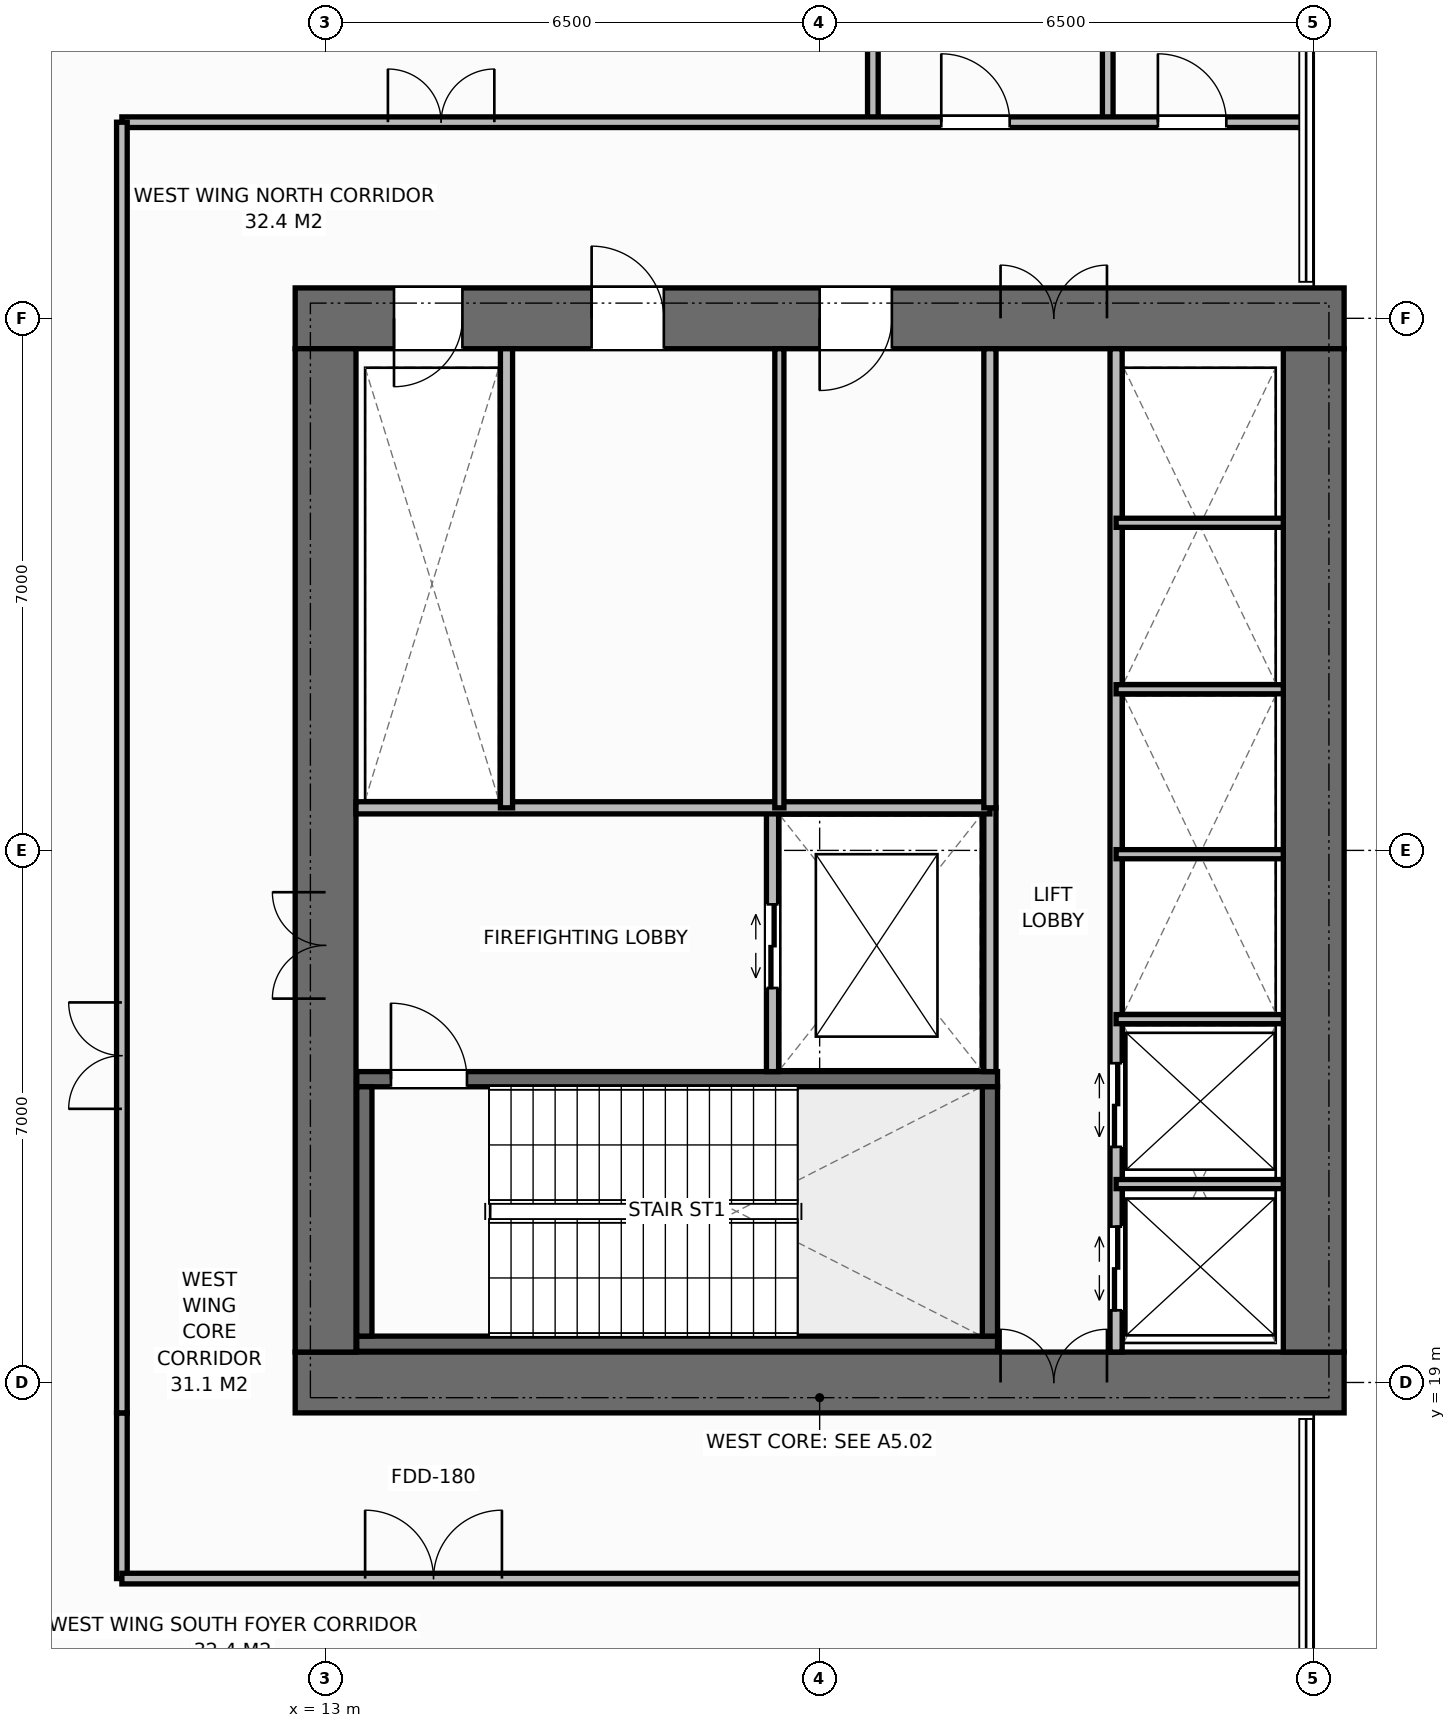
"""IFC4 building model, lengths in metres.
Left out: names, types, materials, properties, quantities, classifications, styles, units other than length and angle.
Written with IfcOpenShell. Run it as: python <this file> out.ifc"""

import sys

from ifc_helpers import new_model, si_unit, direction, frame, frame_2d, origin, place, context, subcontext, project, spatial, rectangle, extrude, element, fill, save


model = new_model("IFC4")
c1 = context("Model", 3, precision=1e-05, world=origin(), true_north=direction((0.0, 1.0)))
c2 = subcontext(c1, "Body", "Model", "MODEL_VIEW")
j1 = project(units=[si_unit("LENGTHUNIT", "METRE"), si_unit("PLANEANGLEUNIT", "RADIAN")], contexts=[c1])
p1 = place(None, origin())
s1 = spatial("IfcSite", under=j1, at=p1, CompositionType="ELEMENT")
p2 = place(p1, origin())
s2 = spatial("IfcBuilding", under=s1, at=p2, CompositionType="ELEMENT")
p3 = place(p2, frame((0.0, 0.0, 17.0)))
s3 = spatial("IfcBuildingStorey", under=s2, at=p3, CompositionType="ELEMENT", Elevation=17.0)
p4 = place(p3, frame((12.6, 19.0, 0.0), z_axis=(0.0, 0.0, 1.0), x_axis=(1.0, 0.0, 0.0)))
e1 = element("IfcWall", 1, at=p4, inside=s3, PredefinedType="SHEAR", context=c2, shape_type="SweptSolid", body=[
    extrude(rectangle(XDim=13.8, YDim=0.8, at=frame_2d((6.9, 0.0))), origin(), (0.0, 0.0, 1.0), 5.0),
])
p5 = place(p4, frame((9.28, 0.0, 0.0)))
e2 = element("IfcOpeningElement", 2, at=p5, cuts=e1, PredefinedType="OPENING", context=c2, shape_type="SweptSolid", body=[
    extrude(rectangle(XDim=1.4, YDim=2.2, at=frame_2d((0.7, 1.1))), frame((0.0, 0.41, 0.0), z_axis=(0.0, -1.0, 0.0), x_axis=(1.0, 0.0, 0.0)), (0.0, 0.0, 1.0), 0.82),
])
p6 = place(p3, frame((12.6, 33.0, 0.0), z_axis=(0.0, 0.0, 1.0), x_axis=(1.0, 0.0, 0.0)))
e3 = element("IfcWall", 3, at=p6, inside=s3, PredefinedType="SHEAR", context=c2, shape_type="SweptSolid", body=[
    extrude(rectangle(XDim=13.8, YDim=0.8, at=frame_2d((6.9, 0.0))), origin(), (0.0, 0.0, 1.0), 5.0),
])
p7 = place(p6, frame((1.3, 0.0, 0.0)))
e4 = element("IfcOpeningElement", 4, at=p7, cuts=e3, PredefinedType="OPENING", context=c2, shape_type="SweptSolid", body=[
    extrude(rectangle(XDim=0.9, YDim=2.15, at=frame_2d((0.45, 1.075))), frame((0.0, 0.41, 0.0), z_axis=(0.0, -1.0, 0.0), x_axis=(1.0, 0.0, 0.0)), (0.0, 0.0, 1.0), 0.82),
])
p8 = place(p6, frame((3.9, 0.0, 0.0)))
e5 = element("IfcOpeningElement", 5, at=p8, cuts=e3, PredefinedType="OPENING", context=c2, shape_type="SweptSolid", body=[
    extrude(rectangle(XDim=0.95, YDim=2.15, at=frame_2d((0.475, 1.075))), frame((0.0, 0.41, 0.0), z_axis=(0.0, -1.0, 0.0), x_axis=(1.0, 0.0, 0.0)), (0.0, 0.0, 1.0), 0.82),
])
p9 = place(p6, frame((6.9, 0.0, 0.0)))
e6 = element("IfcOpeningElement", 6, at=p9, cuts=e3, PredefinedType="OPENING", context=c2, shape_type="SweptSolid", body=[
    extrude(rectangle(XDim=0.95, YDim=2.15, at=frame_2d((0.475, 1.075))), frame((0.0, 0.41, 0.0), z_axis=(0.0, -1.0, 0.0), x_axis=(1.0, 0.0, 0.0)), (0.0, 0.0, 1.0), 0.82),
])
p10 = place(p6, frame((9.28, 0.0, 0.0)))
e7 = element("IfcOpeningElement", 7, at=p10, cuts=e3, PredefinedType="OPENING", context=c2, shape_type="SweptSolid", body=[
    extrude(rectangle(XDim=1.4, YDim=2.2, at=frame_2d((0.7, 1.1))), frame((0.0, 0.41, 0.0), z_axis=(0.0, -1.0, 0.0), x_axis=(1.0, 0.0, 0.0)), (0.0, 0.0, 1.0), 0.82),
])
p11 = place(p3, frame((13.0, 19.4, 0.0), z_axis=(0.0, 0.0, 1.0), x_axis=(0.0, 1.0, 0.0)))
e8 = element("IfcWall", 8, at=p11, inside=s3, PredefinedType="SHEAR", context=c2, shape_type="SweptSolid", body=[
    extrude(rectangle(XDim=13.2, YDim=0.8, at=frame_2d((6.6, 0.0))), origin(), (0.0, 0.0, 1.0), 5.0),
])
p12 = place(p11, frame((4.65, 0.0, 0.0)))
e9 = element("IfcOpeningElement", 9, at=p12, cuts=e8, PredefinedType="OPENING", context=c2, shape_type="SweptSolid", body=[
    extrude(rectangle(XDim=1.4, YDim=2.2, at=frame_2d((0.7, 1.1))), frame((0.0, 0.41, 0.0), z_axis=(0.0, -1.0, 0.0), x_axis=(1.0, 0.0, 0.0)), (0.0, 0.0, 1.0), 0.82),
])
p13 = place(p3, frame((26.0, 19.4, 0.0), z_axis=(0.0, 0.0, 1.0), x_axis=(0.0, 1.0, 0.0)))
e10 = element("IfcWall", 10, at=p13, inside=s3, PredefinedType="SHEAR", context=c2, shape_type="SweptSolid", body=[
    extrude(rectangle(XDim=13.2, YDim=0.8, at=frame_2d((6.6, 0.0))), origin(), (0.0, 0.0, 1.0), 5.0),
])
p14 = place(p3, frame((13.41, 19.51, 0.0), z_axis=(0.0, 0.0, 1.0), x_axis=(1.0, 0.0, 0.0)))
e11 = element("IfcWall", 11, at=p14, inside=s3, PredefinedType="SHEAR", context=c2, shape_type="SweptSolid", body=[
    extrude(rectangle(XDim=8.43, YDim=0.2, at=frame_2d((4.215, 0.0))), origin(), (0.0, 0.0, 1.0), 5.0),
])
p15 = place(p3, frame((13.41, 22.99, 0.0), z_axis=(0.0, 0.0, 1.0), x_axis=(1.0, 0.0, 0.0)))
e12 = element("IfcWall", 12, at=p15, inside=s3, PredefinedType="SHEAR", context=c2, shape_type="SweptSolid", body=[
    extrude(rectangle(XDim=8.43, YDim=0.2, at=frame_2d((4.215, 0.0))), origin(), (0.0, 0.0, 1.0), 5.0),
])
p16 = place(p15, frame((0.45, 0.0, 0.0)))
e13 = element("IfcOpeningElement", 13, at=p16, cuts=e12, PredefinedType="OPENING", context=c2, shape_type="SweptSolid", body=[
    extrude(rectangle(XDim=1.0, YDim=2.15, at=frame_2d((0.5, 1.075))), frame((0.0, 0.11, 0.0), z_axis=(0.0, -1.0, 0.0), x_axis=(1.0, 0.0, 0.0)), (0.0, 0.0, 1.0), 0.22),
])
for number, where, z_axis, x_axis in (
    (14, (13.51, 19.61, 0.0), (0.0, 0.0, 1.0), (0.0, 1.0, 0.0)),
    (15, (21.74, 19.61, 0.0), (0.0, 0.0, 1.0), (0.0, 1.0, 0.0)),
):
    element("IfcWall", number, at=place(p3, frame(where, z_axis=z_axis, x_axis=x_axis)), inside=s3, PredefinedType="SHEAR", context=c2, shape_type="SweptSolid", body=[
        extrude(rectangle(XDim=3.28, YDim=0.2, at=frame_2d((1.64, 0.0))), origin(), (0.0, 0.0, 1.0), 5.0),
    ])
p17 = place(p3, frame((21.74, 23.09, 0.0), z_axis=(0.0, 0.0, 1.0), x_axis=(0.0, 1.0, 0.0)))
e16 = element("IfcWall", 16, at=p17, inside=s3, PredefinedType="STANDARD", context=c2, shape_type="SweptSolid", body=[
    extrude(rectangle(XDim=3.47, YDim=0.16, at=frame_2d((1.735, 0.0))), origin(), (0.0, 0.0, 1.0), 4.4),
])
p18 = place(p3, frame((18.88, 23.09, 0.0), z_axis=(0.0, 0.0, 1.0), x_axis=(0.0, 1.0, 0.0)))
e17 = element("IfcWall", 17, at=p18, inside=s3, PredefinedType="STANDARD", context=c2, shape_type="SweptSolid", body=[
    extrude(rectangle(XDim=3.47, YDim=0.16, at=frame_2d((1.735, 0.0))), origin(), (0.0, 0.0, 1.0), 4.4),
])
p19 = place(p18, frame((1.1, 0.0, 0.0)))
e18 = element("IfcOpeningElement", 18, at=p19, cuts=e17, PredefinedType="OPENING", context=c2, shape_type="SweptSolid", body=[
    extrude(rectangle(XDim=1.1, YDim=2.2, at=frame_2d((0.55, 1.1))), frame((0.0, 0.09, 0.0), z_axis=(0.0, -1.0, 0.0), x_axis=(1.0, 0.0, 0.0)), (0.0, 0.0, 1.0), 0.18),
])
p20 = place(p3, frame((13.4, 26.56, 0.0), z_axis=(0.0, 0.0, 1.0), x_axis=(1.0, 0.0, 0.0)))
e19 = element("IfcWall", 19, at=p20, inside=s3, PredefinedType="STANDARD", context=c2, shape_type="SweptSolid", body=[
    extrude(rectangle(XDim=8.34, YDim=0.16, at=frame_2d((4.17, 0.0))), origin(), (0.0, 0.0, 1.0), 4.4),
])
p21 = place(p3, frame((15.38, 26.56, 0.0), z_axis=(0.0, 0.0, 1.0), x_axis=(0.0, 1.0, 0.0)))
e20 = element("IfcWall", 20, at=p21, inside=s3, PredefinedType="STANDARD", context=c2, shape_type="SweptSolid", body=[
    extrude(rectangle(XDim=6.04, YDim=0.16, at=frame_2d((3.02, 0.0))), origin(), (0.0, 0.0, 1.0), 4.4),
])
p22 = place(p3, frame((18.97, 26.56, 0.0), z_axis=(0.0, 0.0, 1.0), x_axis=(0.0, 1.0, 0.0)))
e21 = element("IfcWall", 21, at=p22, inside=s3, PredefinedType="PARTITIONING", context=c2, shape_type="SweptSolid", body=[
    extrude(rectangle(XDim=6.04, YDim=0.12, at=frame_2d((3.02, 0.0))), origin(), (0.0, 0.0, 1.0), 4.4),
])
p23 = place(p3, frame((21.74, 26.56, 0.0), z_axis=(0.0, 0.0, 1.0), x_axis=(0.0, 1.0, 0.0)))
e22 = element("IfcWall", 22, at=p23, inside=s3, PredefinedType="STANDARD", context=c2, shape_type="SweptSolid", body=[
    extrude(rectangle(XDim=6.04, YDim=0.16, at=frame_2d((3.02, 0.0))), origin(), (0.0, 0.0, 1.0), 4.4),
])
p24 = place(p3, frame((23.4, 19.4, 0.0), z_axis=(0.0, 0.0, 1.0), x_axis=(0.0, 1.0, 0.0)))
e23 = element("IfcWall", 23, at=p24, inside=s3, PredefinedType="STANDARD", context=c2, shape_type="SweptSolid", body=[
    extrude(rectangle(XDim=13.2, YDim=0.16, at=frame_2d((6.6, 0.0))), origin(), (0.0, 0.0, 1.0), 4.4),
])
p25 = place(p24, frame((0.55, 0.0, 0.0)))
e24 = element("IfcOpeningElement", 24, at=p25, cuts=e23, PredefinedType="OPENING", context=c2, shape_type="SweptSolid", body=[
    extrude(rectangle(XDim=1.1, YDim=2.2, at=frame_2d((0.55, 1.1))), frame((0.0, 0.09, 0.0), z_axis=(0.0, -1.0, 0.0), x_axis=(1.0, 0.0, 0.0)), (0.0, 0.0, 1.0), 0.18),
])
p26 = place(p24, frame((2.7, 0.0, 0.0)))
e25 = element("IfcOpeningElement", 25, at=p26, cuts=e23, PredefinedType="OPENING", context=c2, shape_type="SweptSolid", body=[
    extrude(rectangle(XDim=1.1, YDim=2.2, at=frame_2d((0.55, 1.1))), frame((0.0, 0.09, 0.0), z_axis=(0.0, -1.0, 0.0), x_axis=(1.0, 0.0, 0.0)), (0.0, 0.0, 1.0), 0.18),
])
for number, where, z_axis, x_axis in (
    (26, (23.4, 21.61, 0.0), (0.0, 0.0, 1.0), (1.0, 0.0, 0.0)),
    (27, (23.4, 23.78, 0.0), (0.0, 0.0, 1.0), (1.0, 0.0, 0.0)),
    (28, (23.4, 25.95, 0.0), (0.0, 0.0, 1.0), (1.0, 0.0, 0.0)),
    (29, (23.4, 28.12, 0.0), (0.0, 0.0, 1.0), (1.0, 0.0, 0.0)),
    (30, (23.4, 30.31, 0.0), (0.0, 0.0, 1.0), (1.0, 0.0, 0.0)),
):
    element("IfcWall", number, at=place(p3, frame(where, z_axis=z_axis, x_axis=x_axis)), inside=s3, PredefinedType="PARTITIONING", context=c2, shape_type="SweptSolid", body=[
        extrude(rectangle(XDim=2.2, YDim=0.12, at=frame_2d((1.1, 0.0))), origin(), (0.0, 0.0, 1.0), 4.4),
    ])
for number, where, z_axis, x_axis in (
    (31, (20.2, 35.58, 0.0), (0.0, 0.0, 1.0), (0.0, 1.0, 0.0)),
    (32, (23.29, 35.58, 0.0), (0.0, 0.0, 1.0), (0.0, 1.0, 0.0)),
):
    element("IfcWall", number, at=place(p3, frame(where, z_axis=z_axis, x_axis=x_axis)), inside=s3, PredefinedType="PARTITIONING", context=c2, shape_type="SweptSolid", body=[
        extrude(rectangle(XDim=2.6, YDim=0.14, at=frame_2d((1.3, 0.0))), origin(), (0.0, 0.0, 1.0), 4.4),
    ])
p27 = place(p3, frame((10.32, 35.58, 0.0), z_axis=(0.0, 0.0, 1.0), x_axis=(1.0, 0.0, 0.0)))
e33 = element("IfcWall", 33, at=p27, inside=s3, PredefinedType="PARTITIONING", context=c2, shape_type="SweptSolid", body=[
    extrude(rectangle(XDim=15.6, YDim=0.14, at=frame_2d((7.8, 0.0))), origin(), (0.0, 0.0, 1.0), 4.4),
])
p28 = place(p27, frame((10.78, 0.0, 0.0)))
e34 = element("IfcOpeningElement", 34, at=p28, cuts=e33, PredefinedType="OPENING", context=c2, shape_type="SweptSolid", body=[
    extrude(rectangle(XDim=0.9, YDim=2.15, at=frame_2d((0.45, 1.075))), frame((0.0, 0.08, 0.0), z_axis=(0.0, -1.0, 0.0), x_axis=(1.0, 0.0, 0.0)), (0.0, 0.0, 1.0), 0.16),
])
p29 = place(p27, frame((13.63, 0.0, 0.0)))
e35 = element("IfcOpeningElement", 35, at=p29, cuts=e33, PredefinedType="OPENING", context=c2, shape_type="SweptSolid", body=[
    extrude(rectangle(XDim=0.9, YDim=2.15, at=frame_2d((0.45, 1.075))), frame((0.0, 0.08, 0.0), z_axis=(0.0, -1.0, 0.0), x_axis=(1.0, 0.0, 0.0)), (0.0, 0.0, 1.0), 0.16),
])
p30 = place(p27, frame((3.5, 0.0, 0.0)))
e36 = element("IfcOpeningElement", 36, at=p30, cuts=e33, PredefinedType="OPENING", context=c2, shape_type="SweptSolid", body=[
    extrude(rectangle(XDim=1.4, YDim=2.2, at=frame_2d((0.7, 1.1))), frame((0.0, 0.08, 0.0), z_axis=(0.0, -1.0, 0.0), x_axis=(1.0, 0.0, 0.0)), (0.0, 0.0, 1.0), 0.16),
])
p31 = place(p3, frame((10.32, 16.42, 0.0), z_axis=(0.0, 0.0, 1.0), x_axis=(0.0, 1.0, 0.0)))
e37 = element("IfcWall", 37, at=p31, inside=s3, PredefinedType="PARTITIONING", context=c2, shape_type="SweptSolid", body=[
    extrude(rectangle(XDim=2.18, YDim=0.14, at=frame_2d((1.09, 0.0))), origin(), (0.0, 0.0, 1.0), 4.4),
])
p32 = place(p3, frame((10.32, 16.42, 0.0), z_axis=(0.0, 0.0, 1.0), x_axis=(1.0, 0.0, 0.0)))
e38 = element("IfcWall", 38, at=p32, inside=s3, PredefinedType="PARTITIONING", context=c2, shape_type="SweptSolid", body=[
    extrude(rectangle(XDim=15.6, YDim=0.14, at=frame_2d((7.8, 0.0))), origin(), (0.0, 0.0, 1.0), 4.4),
])
p33 = place(p32, frame((3.2, 0.0, 0.0)))
e39 = element("IfcOpeningElement", 39, at=p33, cuts=e38, PredefinedType="OPENING", context=c2, shape_type="SweptSolid", body=[
    extrude(rectangle(XDim=1.8, YDim=2.2, at=frame_2d((0.9, 1.1))), frame((0.0, 0.08, 0.0), z_axis=(0.0, -1.0, 0.0), x_axis=(1.0, 0.0, 0.0)), (0.0, 0.0, 1.0), 0.16),
])
p34 = place(p3, frame((10.32, 18.6, 0.0), z_axis=(0.0, 0.0, 1.0), x_axis=(0.0, 1.0, 0.0)))
e40 = element("IfcWall", 40, at=p34, inside=s3, PredefinedType="PARTITIONING", context=c2, shape_type="SweptSolid", body=[
    extrude(rectangle(XDim=16.98, YDim=0.14, at=frame_2d((8.49, 0.0))), origin(), (0.0, 0.0, 1.0), 4.4),
])
p35 = place(p34, frame((4.0, 0.0, 0.0)))
e41 = element("IfcOpeningElement", 41, at=p35, cuts=e40, PredefinedType="OPENING", context=c2, shape_type="SweptSolid", body=[
    extrude(rectangle(XDim=1.4, YDim=2.2, at=frame_2d((0.7, 1.1))), frame((0.0, 0.08, 0.0), z_axis=(0.0, -1.0, 0.0), x_axis=(1.0, 0.0, 0.0)), (0.0, 0.0, 1.0), 0.16),
])
p36 = place(p16, origin())
e42 = element("IfcDoor", 42, at=p36, inside=s3, OperationType="SINGLE_SWING_LEFT", PredefinedType="DOOR", context=c2, shape_type="SweptSolid", body=[
    extrude(rectangle(XDim=1.0, YDim=2.15, at=frame_2d((0.5, 1.075))), frame((0.0, 0.025, 0.0), z_axis=(0.0, -1.0, 0.0), x_axis=(1.0, 0.0, 0.0)), (0.0, 0.0, 1.0), 0.05),
])
fill(e13, e42)
p37 = place(p12, origin())
e43 = element("IfcDoor", 43, at=p37, inside=s3, OperationType="DOUBLE_DOOR_SINGLE_SWING", PredefinedType="DOOR", context=c2, shape_type="SweptSolid", body=[
    extrude(rectangle(XDim=1.4, YDim=2.2, at=frame_2d((0.7, 1.1))), frame((0.0, 0.025, 0.0), z_axis=(0.0, -1.0, 0.0), x_axis=(1.0, 0.0, 0.0)), (0.0, 0.0, 1.0), 0.05),
])
fill(e9, e43)
p38 = place(p19, origin())
e44 = element("IfcDoor", 44, at=p38, inside=s3, OperationType="DOUBLE_DOOR_SLIDING", PredefinedType="DOOR", context=c2, shape_type="SweptSolid", body=[
    extrude(rectangle(XDim=1.1, YDim=2.2, at=frame_2d((0.55, 1.1))), frame((0.0, 0.025, 0.0), z_axis=(0.0, -1.0, 0.0), x_axis=(1.0, 0.0, 0.0)), (0.0, 0.0, 1.0), 0.05),
])
fill(e18, e44)
p39 = place(p7, origin())
e45 = element("IfcDoor", 45, at=p39, inside=s3, OperationType="SINGLE_SWING_RIGHT", PredefinedType="DOOR", context=c2, shape_type="SweptSolid", body=[
    extrude(rectangle(XDim=0.9, YDim=2.15, at=frame_2d((0.45, 1.075))), frame((0.0, -0.075, 0.0), z_axis=(0.0, -1.0, 0.0), x_axis=(1.0, 0.0, 0.0)), (0.0, 0.0, 1.0), 0.05),
])
fill(e4, e45)
p40 = place(p8, origin())
e46 = element("IfcDoor", 46, at=p40, inside=s3, OperationType="SINGLE_SWING_LEFT", PredefinedType="DOOR", context=c2, shape_type="SweptSolid", body=[
    extrude(rectangle(XDim=0.95, YDim=2.15, at=frame_2d((0.475, 1.075))), frame((0.0, -0.075, 0.0), z_axis=(0.0, -1.0, 0.0), x_axis=(1.0, 0.0, 0.0)), (0.0, 0.0, 1.0), 0.05),
])
fill(e5, e46)
p41 = place(p9, origin())
e47 = element("IfcDoor", 47, at=p41, inside=s3, OperationType="SINGLE_SWING_RIGHT", PredefinedType="DOOR", context=c2, shape_type="SweptSolid", body=[
    extrude(rectangle(XDim=0.95, YDim=2.15, at=frame_2d((0.475, 1.075))), frame((0.0, -0.075, 0.0), z_axis=(0.0, -1.0, 0.0), x_axis=(1.0, 0.0, 0.0)), (0.0, 0.0, 1.0), 0.05),
])
fill(e6, e47)
p42 = place(p5, origin())
e48 = element("IfcDoor", 48, at=p42, inside=s3, OperationType="DOUBLE_DOOR_SINGLE_SWING", PredefinedType="DOOR", context=c2, shape_type="SweptSolid", body=[
    extrude(rectangle(XDim=1.4, YDim=2.2, at=frame_2d((0.7, 1.1))), frame((0.0, 0.125, 0.0), z_axis=(0.0, -1.0, 0.0), x_axis=(1.0, 0.0, 0.0)), (0.0, 0.0, 1.0), 0.05),
])
fill(e2, e48)
p43 = place(p10, origin())
e49 = element("IfcDoor", 49, at=p43, inside=s3, OperationType="DOUBLE_DOOR_SINGLE_SWING", PredefinedType="DOOR", context=c2, shape_type="SweptSolid", body=[
    extrude(rectangle(XDim=1.4, YDim=2.2, at=frame_2d((0.7, 1.1))), frame((0.0, -0.075, 0.0), z_axis=(0.0, -1.0, 0.0), x_axis=(1.0, 0.0, 0.0)), (0.0, 0.0, 1.0), 0.05),
])
fill(e7, e49)
p44 = place(p25, origin())
e50 = element("IfcDoor", 50, at=p44, inside=s3, OperationType="DOUBLE_DOOR_SLIDING", PredefinedType="DOOR", context=c2, shape_type="SweptSolid", body=[
    extrude(rectangle(XDim=1.1, YDim=2.2, at=frame_2d((0.55, 1.1))), frame((0.0, 0.025, 0.0), z_axis=(0.0, -1.0, 0.0), x_axis=(1.0, 0.0, 0.0)), (0.0, 0.0, 1.0), 0.05),
])
fill(e24, e50)
p45 = place(p26, origin())
e51 = element("IfcDoor", 51, at=p45, inside=s3, OperationType="DOUBLE_DOOR_SLIDING", PredefinedType="DOOR", context=c2, shape_type="SweptSolid", body=[
    extrude(rectangle(XDim=1.1, YDim=2.2, at=frame_2d((0.55, 1.1))), frame((0.0, 0.025, 0.0), z_axis=(0.0, -1.0, 0.0), x_axis=(1.0, 0.0, 0.0)), (0.0, 0.0, 1.0), 0.05),
])
fill(e25, e51)
p46 = place(p28, origin())
e52 = element("IfcDoor", 52, at=p46, inside=s3, OperationType="SINGLE_SWING_LEFT", PredefinedType="DOOR", context=c2, shape_type="SweptSolid", body=[
    extrude(rectangle(XDim=0.9, YDim=2.15, at=frame_2d((0.45, 1.075))), frame((0.0, 0.025, 0.0), z_axis=(0.0, -1.0, 0.0), x_axis=(1.0, 0.0, 0.0)), (0.0, 0.0, 1.0), 0.05),
])
fill(e34, e52)
p47 = place(p29, origin())
e53 = element("IfcDoor", 53, at=p47, inside=s3, OperationType="SINGLE_SWING_LEFT", PredefinedType="DOOR", context=c2, shape_type="SweptSolid", body=[
    extrude(rectangle(XDim=0.9, YDim=2.15, at=frame_2d((0.45, 1.075))), frame((0.0, 0.025, 0.0), z_axis=(0.0, -1.0, 0.0), x_axis=(1.0, 0.0, 0.0)), (0.0, 0.0, 1.0), 0.05),
])
fill(e35, e53)
p48 = place(p30, origin())
e54 = element("IfcDoor", 54, at=p48, inside=s3, OperationType="DOUBLE_DOOR_SINGLE_SWING", PredefinedType="DOOR", context=c2, shape_type="SweptSolid", body=[
    extrude(rectangle(XDim=1.4, YDim=2.2, at=frame_2d((0.7, 1.1))), frame((0.0, 0.025, 0.0), z_axis=(0.0, -1.0, 0.0), x_axis=(1.0, 0.0, 0.0)), (0.0, 0.0, 1.0), 0.05),
])
fill(e36, e54)
p49 = place(p33, origin())
e55 = element("IfcDoor", 55, at=p49, inside=s3, OperationType="DOUBLE_DOOR_SINGLE_SWING", PredefinedType="DOOR", context=c2, shape_type="SweptSolid", body=[
    extrude(rectangle(XDim=1.8, YDim=2.2, at=frame_2d((0.9, 1.1))), frame((0.0, 0.025, 0.0), z_axis=(0.0, -1.0, 0.0), x_axis=(1.0, 0.0, 0.0)), (0.0, 0.0, 1.0), 0.05),
])
fill(e39, e55)
p50 = place(p35, origin())
e56 = element("IfcDoor", 56, at=p50, inside=s3, OperationType="DOUBLE_DOOR_SINGLE_SWING", PredefinedType="DOOR", context=c2, shape_type="SweptSolid", body=[
    extrude(rectangle(XDim=1.4, YDim=2.2, at=frame_2d((0.7, 1.1))), frame((0.0, 0.025, 0.0), z_axis=(0.0, -1.0, 0.0), x_axis=(1.0, 0.0, 0.0)), (0.0, 0.0, 1.0), 0.05),
])
fill(e41, e56)
save(model, sys.argv[1])
